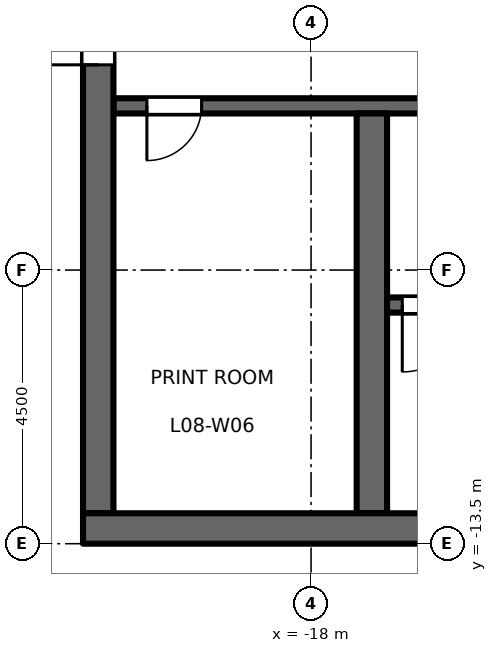
"""IFC4 building model, lengths in metres.
Left out: names, types, materials, properties, quantities, classifications, styles, units other than length and angle.
Written with IfcOpenShell. Run it as: python <this file> out.ifc"""

import sys

from ifc_helpers import new_model, si_unit, direction, frame, frame_2d, origin, place, context, subcontext, project, spatial, rectangle, extrude, element, fill, save


model = new_model("IFC4")
c1 = context("Model", 3, precision=1e-05, world=origin(), true_north=direction((0.0, 1.0)))
c2 = subcontext(c1, "Body", "Model", "MODEL_VIEW")
j1 = project(units=[si_unit("LENGTHUNIT", "METRE"), si_unit("PLANEANGLEUNIT", "RADIAN")], contexts=[c1])
p1 = place(None, origin())
s1 = spatial("IfcSite", under=j1, at=p1, CompositionType="ELEMENT")
p2 = place(p1, origin())
s2 = spatial("IfcBuilding", under=s1, at=p2, CompositionType="ELEMENT")
p3 = place(p2, frame((0.0, 0.0, 40.2)))
s3 = spatial("IfcBuildingStorey", under=s2, at=p3, CompositionType="ELEMENT", Elevation=40.2)
p4 = place(p3, frame((-12.15, -6.3, 0.0), z_axis=(0.0, 0.0, 1.0), x_axis=(-1.0, 0.0, 0.0)))
e1 = element("IfcWall", 1, at=p4, inside=s3, PredefinedType="SHEAR", context=c2, shape_type="SweptSolid", body=[
    extrude(rectangle(XDim=9.1, YDim=0.25, at=frame_2d((4.55, 0.0))), origin(), (0.0, 0.0, 1.0), 4.35),
])
p5 = place(p4, frame((1.8, 0.0, 0.0)))
e2 = element("IfcOpeningElement", 2, at=p5, cuts=e1, PredefinedType="OPENING", context=c2, shape_type="SweptSolid", body=[
    extrude(rectangle(XDim=1.0, YDim=2.1, at=frame_2d((0.5, 1.05))), frame((0.0, 0.135, 0.0), z_axis=(0.0, -1.0, 0.0), x_axis=(1.0, 0.0, 0.0)), (0.0, 0.0, 1.0), 0.27),
])
p6 = place(p4, frame((7.65, 0.0, 0.0)))
e3 = element("IfcOpeningElement", 3, at=p6, cuts=e1, PredefinedType="OPENING", context=c2, shape_type="SweptSolid", body=[
    extrude(rectangle(XDim=0.9, YDim=2.1, at=frame_2d((0.45, 1.05))), frame((0.0, 0.135, 0.0), z_axis=(0.0, -1.0, 0.0), x_axis=(1.0, 0.0, 0.0)), (0.0, 0.0, 1.0), 0.27),
])
p7 = place(p3, frame((-21.5, -13.0, 0.0), z_axis=(0.0, 0.0, 1.0), x_axis=(0.0, 1.0, 0.0)))
e4 = element("IfcWall", 4, at=p7, inside=s3, PredefinedType="SHEAR", context=c2, shape_type="SweptSolid", body=[
    extrude(rectangle(XDim=26.0, YDim=0.5, at=frame_2d((13.0, 0.0))), origin(), (0.0, 0.0, 1.0), 4.35),
])
p8 = place(p7, frame((16.825, 0.0, 0.0)))
e5 = element("IfcOpeningElement", 5, at=p8, cuts=e4, PredefinedType="OPENING", context=c2, shape_type="SweptSolid", body=[
    extrude(rectangle(XDim=1.8, YDim=2.1, at=frame_2d((0.9, 1.05))), frame((0.0, 0.26, 0.0), z_axis=(0.0, -1.0, 0.0), x_axis=(1.0, 0.0, 0.0)), (0.0, 0.0, 1.0), 0.52),
])
p9 = place(p7, frame((7.375, 0.0, 0.0)))
e6 = element("IfcOpeningElement", 6, at=p9, cuts=e4, PredefinedType="OPENING", context=c2, shape_type="SweptSolid", body=[
    extrude(rectangle(XDim=1.8, YDim=2.1, at=frame_2d((0.9, 1.05))), frame((0.0, 0.26, 0.0), z_axis=(0.0, -1.0, 0.0), x_axis=(1.0, 0.0, 0.0)), (0.0, 0.0, 1.0), 0.52),
])
p10 = place(p3, frame((-17.0, -13.0, 0.0), z_axis=(0.0, 0.0, 1.0), x_axis=(0.0, 1.0, 0.0)))
e7 = element("IfcWall", 7, at=p10, inside=s3, PredefinedType="SHEAR", context=c2, shape_type="SweptSolid", body=[
    extrude(rectangle(XDim=6.575, YDim=0.5, at=frame_2d((3.288, 0.0))), origin(), (0.0, 0.0, 1.0), 4.35),
])
p11 = place(p3, frame((-8.75, -9.575, 0.0), z_axis=(0.0, 0.0, 1.0), x_axis=(-1.0, 0.0, 0.0)))
e8 = element("IfcWall", 8, at=p11, inside=s3, PredefinedType="SHEAR", context=c2, shape_type="SweptSolid", body=[
    extrude(rectangle(XDim=8.0, YDim=0.25, at=frame_2d((4.0, 0.0))), origin(), (0.0, 0.0, 1.0), 4.35),
])
p12 = place(p11, frame((6.65, 0.0, 0.0)))
e9 = element("IfcOpeningElement", 9, at=p12, cuts=e8, PredefinedType="OPENING", context=c2, shape_type="SweptSolid", body=[
    extrude(rectangle(XDim=1.1, YDim=2.1, at=frame_2d((0.55, 1.05))), frame((0.0, 0.135, 0.0), z_axis=(0.0, -1.0, 0.0), x_axis=(1.0, 0.0, 0.0)), (0.0, 0.0, 1.0), 0.27),
])
p13 = place(p3, frame((-8.25, -13.25, 0.0), z_axis=(0.0, 0.0, 1.0), x_axis=(-1.0, 0.0, 0.0)))
e10 = element("IfcWall", 10, at=p13, inside=s3, PredefinedType="SHEAR", context=c2, shape_type="SweptSolid", body=[
    extrude(rectangle(XDim=13.5, YDim=0.5, at=frame_2d((6.75, 0.0))), origin(), (0.0, 0.0, 1.0), 4.35),
])
p14 = place(p12, origin())
e11 = element("IfcDoor", 11, at=p14, inside=s3, OperationType="SINGLE_SWING_LEFT", PredefinedType="DOOR", context=c2, shape_type="SweptSolid", body=[
    extrude(rectangle(XDim=1.1, YDim=2.1, at=frame_2d((0.55, 1.05))), frame((0.0, 0.025, 0.0), z_axis=(0.0, -1.0, 0.0), x_axis=(1.0, 0.0, 0.0)), (0.0, 0.0, 1.0), 0.05),
])
fill(e9, e11)
p15 = place(p9, origin())
e12 = element("IfcDoor", 12, at=p15, inside=s3, OperationType="DOUBLE_DOOR_DOUBLE_SWING", PredefinedType="DOOR", context=c2, shape_type="SweptSolid", body=[
    extrude(rectangle(XDim=1.8, YDim=2.1, at=frame_2d((0.9, 1.05))), frame((0.0, 0.025, 0.0), z_axis=(0.0, -1.0, 0.0), x_axis=(1.0, 0.0, 0.0)), (0.0, 0.0, 1.0), 0.05),
])
fill(e6, e12)
p16 = place(p6, origin())
e13 = element("IfcDoor", 13, at=p16, inside=s3, OperationType="SINGLE_SWING_LEFT", PredefinedType="DOOR", context=c2, shape_type="SweptSolid", body=[
    extrude(rectangle(XDim=0.9, YDim=2.1, at=frame_2d((0.45, 1.05))), frame((0.0, 0.025, 0.0), z_axis=(0.0, -1.0, 0.0), x_axis=(1.0, 0.0, 0.0)), (0.0, 0.0, 1.0), 0.05),
])
fill(e3, e13)
save(model, sys.argv[1])
